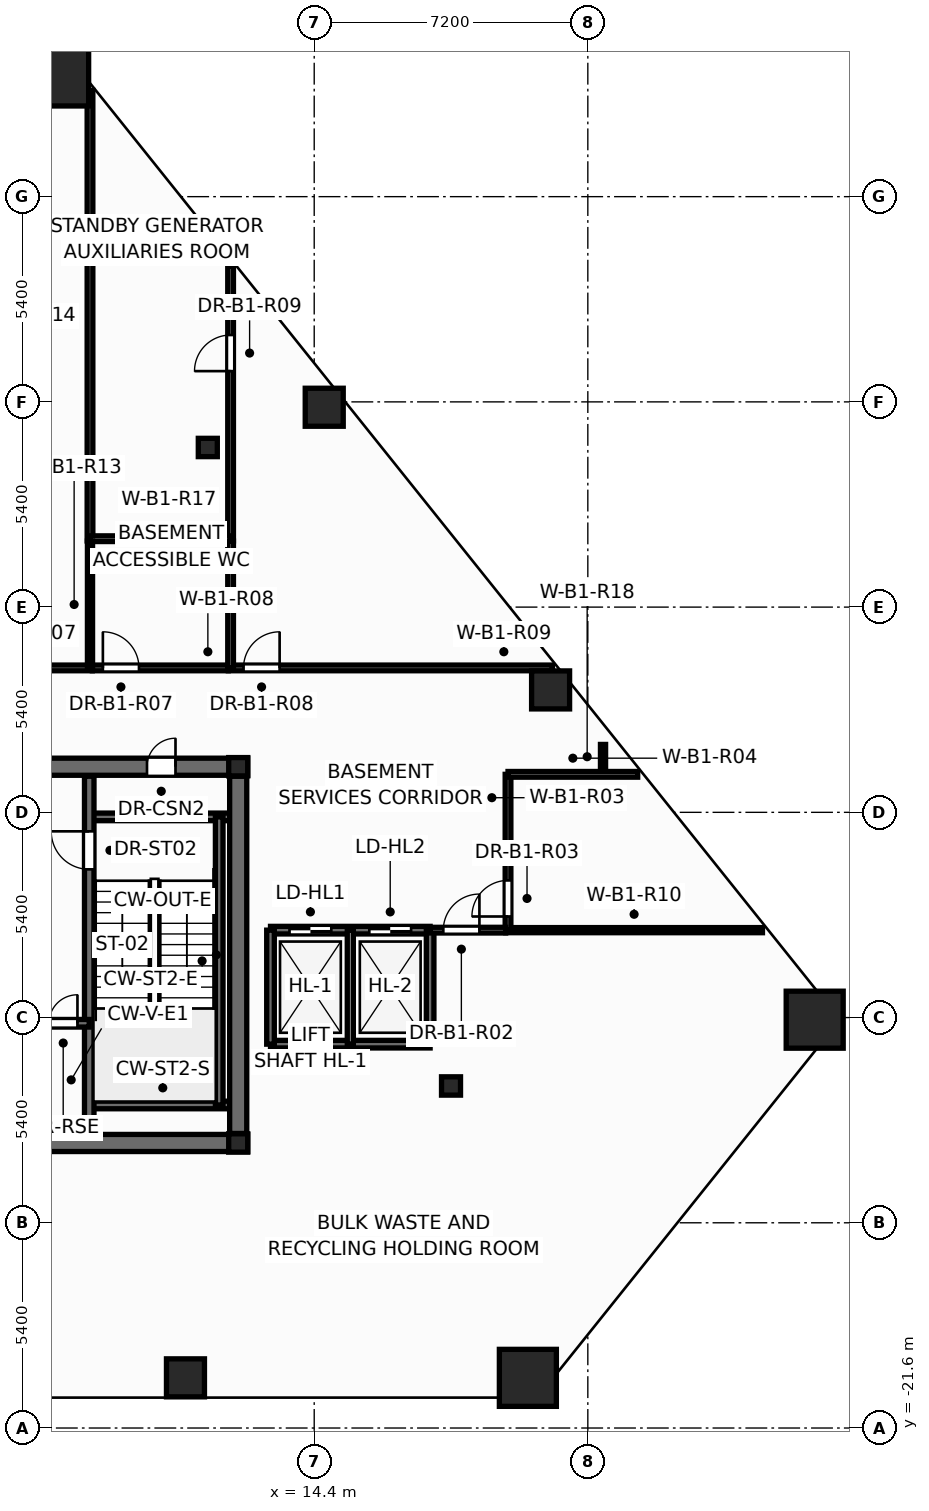
"""IFC4 building model, lengths in metres.
Left out: names, types, materials, properties, quantities, classifications, styles, units other than length and angle.
Written with IfcOpenShell. Run it as: python <this file> out.ifc"""

import sys

from ifc_helpers import new_model, si_unit, direction, frame, frame_2d, origin, origin_2d, place, context, subcontext, project, spatial, rectangle, hollow_rectangle, hollow_circle, i_section, extrude, element, fill, save


model = new_model("IFC4")
c1 = context("Model", 3, precision=1e-05, world=origin(), true_north=direction((0.0, 1.0)))
c2 = subcontext(c1, "Body", "Model", "MODEL_VIEW")
j1 = project(units=[si_unit("LENGTHUNIT", "METRE"), si_unit("PLANEANGLEUNIT", "RADIAN")], contexts=[c1])
p1 = place(None, origin())
s1 = spatial("IfcSite", under=j1, at=p1, CompositionType="ELEMENT")
p2 = place(p1, origin())
s2 = spatial("IfcBuilding", under=s1, at=p2, CompositionType="ELEMENT")
p3 = place(p2, frame((0.0, 0.0, -4.8)))
s3 = spatial("IfcBuildingStorey", under=s2, at=p3, CompositionType="ELEMENT", Elevation=-4.8)
for number, where, z_axis, x_axis in (
    (1, (20.022, -20.28, 0.0), (0.0, 0.0, 1.0), (1.0, 0.0, 0.0)),
    (2, (27.57, -10.856, 0.0), (0.0, 0.0, 1.0), (1.0, 0.0, 0.0)),
    (3, (7.714, 13.936, 0.0), (0.0, 0.0, 1.0), (1.0, 0.0, 0.0)),
):
    element("IfcColumn", number, at=place(p3, frame(where, z_axis=z_axis, x_axis=x_axis)), inside=s3, PredefinedType="COLUMN", context=c2, shape_type="SweptSolid", body=[
        extrude(hollow_rectangle(XDim=1.5, YDim=1.5, WallThickness=0.075, at=origin_2d()), origin(), (0.0, 0.0, 1.0), 4.8),
    ])
for number, where, z_axis, x_axis in (
    (4, (11.012, -20.28, 0.0), (0.0, 0.0, 1.0), (1.0, 0.0, 0.0)),
    (5, (20.62, -2.179, 0.0), (0.0, 0.0, 1.0), (1.0, 0.0, 0.0)),
    (6, (14.664, 5.259, 0.0), (0.0, 0.0, 1.0), (1.0, 0.0, 0.0)),
):
    element("IfcColumn", number, at=place(p3, frame(where, z_axis=z_axis, x_axis=x_axis)), inside=s3, PredefinedType="COLUMN", context=c2, shape_type="SweptSolid", body=[
        extrude(hollow_circle(Radius=0.5, WallThickness=0.045, at=origin_2d()), origin(), (0.0, 0.0, 1.0), 4.8),
    ])
for number, where, z_axis, x_axis in (
    (7, (12.4, -14.1, 0.0), (0.0, 0.0, 1.0), (1.0, 0.0, 0.0)),
    (8, (12.4, -4.2, 0.0), (0.0, 0.0, 1.0), (1.0, 0.0, 0.0)),
    (9, (18.0, -12.6, 0.0), (0.0, 0.0, 1.0), (1.0, 0.0, 0.0)),
    (10, (11.6, 4.2, 0.0), (0.0, 0.0, 1.0), (1.0, 0.0, 0.0)),
):
    element("IfcColumn", number, at=place(p3, frame(where, z_axis=z_axis, x_axis=x_axis)), inside=s3, PredefinedType="COLUMN", context=c2, shape_type="SweptSolid", body=[
        extrude(i_section(OverallWidth=0.5, OverallDepth=0.482, WebThickness=0.04, FlangeThickness=0.045, at=origin_2d()), origin(), (0.0, 0.0, 1.0), 4.8),
    ])
p4 = place(p3, frame((-12.65, -14.1, 0.0), z_axis=(0.0, 0.0, 1.0), x_axis=(1.0, 0.0, 0.0)))
e11 = element("IfcWall", 11, at=p4, inside=s3, PredefinedType="SHEAR", context=c2, shape_type="SweptSolid", body=[
    extrude(rectangle(XDim=25.3, YDim=0.45, at=frame_2d((12.65, 0.0))), origin(), (0.0, 0.0, 1.0), 4.8),
])
p5 = place(p3, frame((-12.65, -4.2, 0.0), z_axis=(0.0, 0.0, 1.0), x_axis=(1.0, 0.0, 0.0)))
e12 = element("IfcWall", 12, at=p5, inside=s3, PredefinedType="SHEAR", context=c2, shape_type="SweptSolid", body=[
    extrude(rectangle(XDim=25.3, YDim=0.45, at=frame_2d((12.65, 0.0))), origin(), (0.0, 0.0, 1.0), 4.8),
])
p6 = place(p5, frame((1.85, 0.0, 0.0)))
e13 = element("IfcOpeningElement", 13, at=p6, cuts=e12, PredefinedType="OPENING", context=c2, shape_type="SweptSolid", body=[
    extrude(rectangle(XDim=0.756, YDim=2.054, at=frame_2d((0.375, 1.027))), frame((0.0, 0.235, 0.0), z_axis=(0.0, -1.0, 0.0), x_axis=(1.0, 0.0, 0.0)), (0.0, 0.0, 1.0), 0.47),
])
p7 = place(p5, frame((22.65, 0.0, 0.0)))
e14 = element("IfcOpeningElement", 14, at=p7, cuts=e12, PredefinedType="OPENING", context=c2, shape_type="SweptSolid", body=[
    extrude(rectangle(XDim=0.756, YDim=2.054, at=frame_2d((0.375, 1.027))), frame((0.0, 0.235, 0.0), z_axis=(0.0, -1.0, 0.0), x_axis=(1.0, 0.0, 0.0)), (0.0, 0.0, 1.0), 0.47),
])
p8 = place(p5, frame((5.85, 0.0, 0.0)))
e15 = element("IfcOpeningElement", 15, at=p8, cuts=e12, PredefinedType="OPENING", context=c2, shape_type="SweptSolid", body=[
    extrude(rectangle(XDim=1.006, YDim=2.104, at=frame_2d((0.5, 1.052))), frame((0.0, 0.235, 0.0), z_axis=(0.0, -1.0, 0.0), x_axis=(1.0, 0.0, 0.0)), (0.0, 0.0, 1.0), 0.47),
])
p9 = place(p5, frame((10.35, 0.0, 0.0)))
e16 = element("IfcOpeningElement", 16, at=p9, cuts=e12, PredefinedType="OPENING", context=c2, shape_type="SweptSolid", body=[
    extrude(rectangle(XDim=1.406, YDim=2.154, at=frame_2d((0.7, 1.077))), frame((0.0, 0.235, 0.0), z_axis=(0.0, -1.0, 0.0), x_axis=(1.0, 0.0, 0.0)), (0.0, 0.0, 1.0), 0.47),
])
p10 = place(p5, frame((18.45, 0.0, 0.0)))
e17 = element("IfcOpeningElement", 17, at=p10, cuts=e12, PredefinedType="OPENING", context=c2, shape_type="SweptSolid", body=[
    extrude(rectangle(XDim=1.006, YDim=2.104, at=frame_2d((0.5, 1.052))), frame((0.0, 0.235, 0.0), z_axis=(0.0, -1.0, 0.0), x_axis=(1.0, 0.0, 0.0)), (0.0, 0.0, 1.0), 0.47),
])
for number, where, z_axis, x_axis in (
    (18, (8.48, -5.52, 0.0), (0.0, 0.0, 1.0), (1.0, 0.0, 0.0)),
    (19, (8.48, -13.1, 0.0), (0.0, 0.0, 1.0), (1.0, 0.0, 0.0)),
):
    element("IfcWall", number, at=place(p3, frame(where, z_axis=z_axis, x_axis=x_axis)), inside=s3, PredefinedType="SOLIDWALL", context=c2, shape_type="SweptSolid", body=[
        extrude(rectangle(XDim=3.87, YDim=0.2, at=frame_2d((1.935, 0.0))), origin(), (0.0, 0.0, 1.0), 4.8),
    ])
p11 = place(p3, frame((11.9, -13.1, 0.0), z_axis=(0.0, 0.0, 1.0), x_axis=(0.0, 1.0, 0.0)))
e20 = element("IfcWall", 20, at=p11, inside=s3, PredefinedType="SOLIDWALL", context=c2, shape_type="SweptSolid", body=[
    extrude(rectangle(XDim=7.58, YDim=0.2, at=frame_2d((3.79, 0.0))), origin(), (0.0, 0.0, 1.0), 4.8),
])
p12 = place(p3, frame((8.48, -13.85, 0.0), z_axis=(0.0, 0.0, 1.0), x_axis=(0.0, 1.0, 0.0)))
e21 = element("IfcWall", 21, at=p12, inside=s3, PredefinedType="SHEAR", context=c2, shape_type="SweptSolid", body=[
    extrude(rectangle(XDim=9.4, YDim=0.25, at=frame_2d((4.7, 0.0))), origin(), (0.0, 0.0, 1.0), 4.8),
])
p13 = place(p12, frame((6.95, 0.0, 0.0)))
e22 = element("IfcOpeningElement", 22, at=p13, cuts=e21, PredefinedType="OPENING", context=c2, shape_type="SweptSolid", body=[
    extrude(rectangle(XDim=1.006, YDim=2.104, at=frame_2d((0.5, 1.052))), frame((0.0, 0.135, 0.0), z_axis=(0.0, -1.0, 0.0), x_axis=(1.0, 0.0, 0.0)), (0.0, 0.0, 1.0), 0.27),
])
p14 = place(p3, frame((5.12, -10.95, 0.0), z_axis=(0.0, 0.0, 1.0), x_axis=(1.0, 0.0, 0.0)))
e23 = element("IfcWall", 23, at=p14, inside=s3, PredefinedType="SOLIDWALL", context=c2, shape_type="SweptSolid", body=[
    extrude(rectangle(XDim=3.36, YDim=0.2, at=frame_2d((1.68, 0.0))), origin(), (0.0, 0.0, 1.0), 4.8),
])
p15 = place(p14, frame((0.42, 0.0, 0.0)))
e24 = element("IfcOpeningElement", 24, at=p15, cuts=e23, PredefinedType="OPENING", context=c2, shape_type="SweptSolid", body=[
    extrude(rectangle(XDim=1.106, YDim=2.104, at=frame_2d((0.55, 1.052))), frame((0.0, 0.11, 0.0), z_axis=(0.0, -1.0, 0.0), x_axis=(1.0, 0.0, 0.0)), (0.0, 0.0, 1.0), 0.22),
])
p16 = place(p14, frame((2.3, 0.0, 0.0)))
e25 = element("IfcOpeningElement", 25, at=p16, cuts=e23, PredefinedType="OPENING", context=c2, shape_type="SweptSolid", body=[
    extrude(rectangle(XDim=0.756, YDim=2.054, at=frame_2d((0.375, 1.027))), frame((0.0, 0.11, 0.0), z_axis=(0.0, -1.0, 0.0), x_axis=(1.0, 0.0, 0.0)), (0.0, 0.0, 1.0), 0.22),
])
p17 = place(p3, frame((12.4, -13.85, 0.0), z_axis=(0.0, 0.0, 1.0), x_axis=(0.0, 1.0, 0.0)))
e26 = element("IfcWall", 26, at=p17, inside=s3, PredefinedType="SHEAR", context=c2, shape_type="SweptSolid", body=[
    extrude(rectangle(XDim=9.4, YDim=0.45, at=frame_2d((4.7, 0.0))), origin(), (0.0, 0.0, 1.0), 4.8),
])
p18 = place(p3, frame((8.5, 1.74, 0.0), z_axis=(0.0, 0.0, 1.0), x_axis=(0.0, 1.0, 0.0)))
e27 = element("IfcWall", 27, at=p18, inside=s3, PredefinedType="PARTITIONING", context=c2, shape_type="SweptSolid", body=[
    extrude(rectangle(XDim=11.855, YDim=0.15, at=frame_2d((5.927, 0.0))), origin(), (0.0, 0.0, 1.0), 3.255),
])
p19 = place(p3, frame((-2.56, -1.6, 0.0), z_axis=(0.0, 0.0, 1.0), x_axis=(1.0, 0.0, 0.0)))
e28 = element("IfcWall", 28, at=p19, inside=s3, PredefinedType="PARTITIONING", context=c2, shape_type="SweptSolid", body=[
    extrude(rectangle(XDim=11.12, YDim=0.15, at=frame_2d((5.56, 0.0))), origin(), (0.0, 0.0, 1.0), 4.48),
])
p20 = place(p19, frame((0.399, 0.0, 0.0)))
e29 = element("IfcOpeningElement", 29, at=p20, cuts=e28, PredefinedType="OPENING", context=c2, shape_type="SweptSolid", body=[
    extrude(rectangle(XDim=0.956, YDim=2.104, at=frame_2d((0.475, 1.052))), frame((0.0, 0.085, 0.0), z_axis=(0.0, -1.0, 0.0), x_axis=(1.0, 0.0, 0.0)), (0.0, 0.0, 1.0), 0.17),
])
p21 = place(p3, frame((12.14, -1.6, 0.0), z_axis=(0.0, 0.0, 1.0), x_axis=(1.0, 0.0, 0.0)))
e30 = element("IfcWall", 30, at=p21, inside=s3, PredefinedType="PARTITIONING", context=c2, shape_type="SweptSolid", body=[
    extrude(rectangle(XDim=8.529, YDim=0.15, at=frame_2d((4.265, 0.0))), origin(), (0.0, 0.0, 1.0), 3.547),
])
p22 = place(p21, frame((0.4, 0.0, 0.0)))
e31 = element("IfcOpeningElement", 31, at=p22, cuts=e30, PredefinedType="OPENING", context=c2, shape_type="SweptSolid", body=[
    extrude(rectangle(XDim=0.956, YDim=2.104, at=frame_2d((0.475, 1.052))), frame((0.0, 0.085, 0.0), z_axis=(0.0, -1.0, 0.0), x_axis=(1.0, 0.0, 0.0)), (0.0, 0.0, 1.0), 0.17),
])
p23 = place(p3, frame((12.2, 1.74, 0.0), z_axis=(0.0, 0.0, 1.0), x_axis=(0.0, 1.0, 0.0)))
e32 = element("IfcWall", 32, at=p23, inside=s3, PredefinedType="PARTITIONING", context=c2, shape_type="SweptSolid", body=[
    extrude(rectangle(XDim=7.235, YDim=0.15, at=frame_2d((3.617, 0.0))), origin(), (0.0, 0.0, 1.0), 3.547),
])
p24 = place(p23, frame((4.469, 0.0, 0.0)))
e33 = element("IfcOpeningElement", 33, at=p24, cuts=e32, PredefinedType="OPENING", context=c2, shape_type="SweptSolid", body=[
    extrude(rectangle(XDim=0.956, YDim=2.104, at=frame_2d((0.475, 1.052))), frame((0.0, 0.085, 0.0), z_axis=(0.0, -1.0, 0.0), x_axis=(1.0, 0.0, 0.0)), (0.0, 0.0, 1.0), 0.17),
])
p25 = place(p3, frame((19.44, -8.5, 0.0), z_axis=(0.0, 0.0, 1.0), x_axis=(1.0, 0.0, 0.0)))
e34 = element("IfcWall", 34, at=p25, inside=s3, PredefinedType="PARTITIONING", context=c2, shape_type="SweptSolid", body=[
    extrude(rectangle(XDim=6.755, YDim=0.135, at=frame_2d((3.378, 0.0))), origin(), (0.0, 0.0, 1.0), 3.844),
])
p26 = place(p3, frame((13.25, -11.5, 0.0), z_axis=(0.0, 0.0, 1.0), x_axis=(1.0, 0.0, 0.0)))
e35 = element("IfcWall", 35, at=p26, inside=s3, PredefinedType="SOLIDWALL", context=c2, shape_type="SweptSolid", body=[
    extrude(rectangle(XDim=4.2, YDim=0.2, at=frame_2d((2.1, 0.0))), origin(), (0.0, 0.0, 1.0), 4.8),
])
p27 = place(p3, frame((13.25, -8.5, 0.0), z_axis=(0.0, 0.0, 1.0), x_axis=(1.0, 0.0, 0.0)))
e36 = element("IfcWall", 36, at=p27, inside=s3, PredefinedType="SOLIDWALL", context=c2, shape_type="SweptSolid", body=[
    extrude(rectangle(XDim=4.2, YDim=0.2, at=frame_2d((2.1, 0.0))), origin(), (0.0, 0.0, 1.0), 4.8),
])
p28 = place(p27, frame((0.5, 0.0, 0.0)))
e37 = element("IfcOpeningElement", 37, at=p28, cuts=e36, PredefinedType="OPENING", context=c2, shape_type="SweptSolid", body=[
    extrude(rectangle(XDim=1.106, YDim=2.104, at=frame_2d((0.55, 1.052))), frame((0.0, 0.11, 0.0), z_axis=(0.0, -1.0, 0.0), x_axis=(1.0, 0.0, 0.0)), (0.0, 0.0, 1.0), 0.22),
])
p29 = place(p27, frame((2.6, 0.0, 0.0)))
e38 = element("IfcOpeningElement", 38, at=p29, cuts=e36, PredefinedType="OPENING", context=c2, shape_type="SweptSolid", body=[
    extrude(rectangle(XDim=1.106, YDim=2.104, at=frame_2d((0.55, 1.052))), frame((0.0, 0.11, 0.0), z_axis=(0.0, -1.0, 0.0), x_axis=(1.0, 0.0, 0.0)), (0.0, 0.0, 1.0), 0.22),
])
p30 = place(p3, frame((19.5, -8.5, 0.0), z_axis=(0.0, 0.0, 1.0), x_axis=(0.0, 1.0, 0.0)))
e39 = element("IfcWall", 39, at=p30, inside=s3, PredefinedType="PARTITIONING", context=c2, shape_type="SweptSolid", body=[
    extrude(rectangle(XDim=4.1, YDim=0.15, at=frame_2d((2.05, 0.0))), origin(), (0.0, 0.0, 1.0), 4.48),
])
p31 = place(p30, frame((0.359, 0.0, 0.0)))
e40 = element("IfcOpeningElement", 40, at=p31, cuts=e39, PredefinedType="OPENING", context=c2, shape_type="SweptSolid", body=[
    extrude(rectangle(XDim=0.956, YDim=2.104, at=frame_2d((0.475, 1.052))), frame((0.0, 0.085, 0.0), z_axis=(0.0, -1.0, 0.0), x_axis=(1.0, 0.0, 0.0)), (0.0, 0.0, 1.0), 0.17),
])
p32 = place(p3, frame((8.562, -1.6, 0.0), z_axis=(0.0, 0.0, 1.0), x_axis=(1.0, 0.0, 0.0)))
e41 = element("IfcWall", 41, at=p32, inside=s3, PredefinedType="PARTITIONING", context=c2, shape_type="SweptSolid", body=[
    extrude(rectangle(XDim=3.576, YDim=0.15, at=frame_2d((1.788, 0.0))), origin(), (0.0, 0.0, 1.0), 4.48),
])
p33 = place(p32, frame((0.277, 0.0, 0.0)))
e42 = element("IfcOpeningElement", 42, at=p33, cuts=e41, PredefinedType="OPENING", context=c2, shape_type="SweptSolid", body=[
    extrude(rectangle(XDim=0.956, YDim=2.104, at=frame_2d((0.475, 1.052))), frame((0.0, 0.085, 0.0), z_axis=(0.0, -1.0, 0.0), x_axis=(1.0, 0.0, 0.0)), (0.0, 0.0, 1.0), 0.17),
])
p34 = place(p3, frame((8.5, 1.8, 0.0), z_axis=(0.0, 0.0, 1.0), x_axis=(1.0, 0.0, 0.0)))
e43 = element("IfcWall", 43, at=p34, inside=s3, PredefinedType="PARTITIONING", context=c2, shape_type="SweptSolid", body=[
    extrude(rectangle(XDim=3.7, YDim=0.15, at=frame_2d((1.85, 0.0))), origin(), (0.0, 0.0, 1.0), 4.48),
])
p35 = place(p3, frame((8.5, -1.6, 0.0), z_axis=(0.0, 0.0, 1.0), x_axis=(0.0, 1.0, 0.0)))
e44 = element("IfcWall", 44, at=p35, inside=s3, PredefinedType="PARTITIONING", context=c2, shape_type="SweptSolid", body=[
    extrude(rectangle(XDim=3.338, YDim=0.135, at=frame_2d((1.669, 0.0))), origin(), (0.0, 0.0, 1.0), 4.48),
])
p36 = place(p3, frame((19.5, -4.4, 0.0), z_axis=(0.0, 0.0, 1.0), x_axis=(1.0, 0.0, 0.0)))
e45 = element("IfcWall", 45, at=p36, inside=s3, PredefinedType="PARTITIONING", context=c2, shape_type="SweptSolid", body=[
    extrude(rectangle(XDim=3.412, YDim=0.15, at=frame_2d((1.706, 0.0))), origin(), (0.0, 0.0, 1.0), 3.844),
])
p37 = place(p3, frame((12.2, -1.6, 0.0), z_axis=(0.0, 0.0, 1.0), x_axis=(0.0, 1.0, 0.0)))
e46 = element("IfcWall", 46, at=p37, inside=s3, PredefinedType="PARTITIONING", context=c2, shape_type="SweptSolid", body=[
    extrude(rectangle(XDim=3.338, YDim=0.15, at=frame_2d((1.669, 0.0))), origin(), (0.0, 0.0, 1.0), 4.48),
])
for number, where, z_axis, x_axis in (
    (47, (13.25, -11.5, 0.0), (0.0, 0.0, 1.0), (0.0, 1.0, 0.0)),
    (48, (17.45, -11.5, 0.0), (0.0, 0.0, 1.0), (0.0, 1.0, 0.0)),
):
    element("IfcWall", number, at=place(p3, frame(where, z_axis=z_axis, x_axis=x_axis)), inside=s3, PredefinedType="SOLIDWALL", context=c2, shape_type="SweptSolid", body=[
        extrude(rectangle(XDim=3.0, YDim=0.2, at=frame_2d((1.5, 0.0))), origin(), (0.0, 0.0, 1.0), 4.8),
    ])
p38 = place(p3, frame((15.35, -11.5, 0.0), z_axis=(0.0, 0.0, 1.0), x_axis=(0.0, 1.0, 0.0)))
e49 = element("IfcWall", 49, at=p38, inside=s3, PredefinedType="PARTITIONING", context=c2, shape_type="SweptSolid", body=[
    extrude(rectangle(XDim=3.0, YDim=0.16, at=frame_2d((1.5, 0.0))), origin(), (0.0, 0.0, 1.0), 4.48),
])
p39 = place(p3, frame((17.452, -8.5, 0.0), z_axis=(0.0, 0.0, 1.0), x_axis=(1.0, 0.0, 0.0)))
e50 = element("IfcWall", 50, at=p39, inside=s3, PredefinedType="PARTITIONING", context=c2, shape_type="SweptSolid", body=[
    extrude(rectangle(XDim=1.986, YDim=0.15, at=frame_2d((0.993, 0.0))), origin(), (0.0, 0.0, 1.0), 4.48),
])
p40 = place(p39, frame((0.345, 0.0, 0.0)))
e51 = element("IfcOpeningElement", 51, at=p40, cuts=e50, PredefinedType="OPENING", context=c2, shape_type="SweptSolid", body=[
    extrude(rectangle(XDim=0.956, YDim=2.104, at=frame_2d((0.475, 1.052))), frame((0.0, 0.085, 0.0), z_axis=(0.0, -1.0, 0.0), x_axis=(1.0, 0.0, 0.0)), (0.0, 0.0, 1.0), 0.17),
])
p41 = place(p3, frame((22.0, -4.26, 0.0), z_axis=(0.0, 0.0, 1.0), x_axis=(0.0, 1.0, 0.0)))
e52 = element("IfcWall", 52, at=p41, inside=s3, PredefinedType="PARTITIONING", context=c2, shape_type="SweptSolid", body=[
    extrude(rectangle(XDim=0.646, YDim=0.135, at=frame_2d((0.323, 0.0))), origin(), (0.0, 0.0, 1.0), 3.844),
])
p42 = place(p13, origin())
e53 = element("IfcDoor", 53, at=p42, inside=s3, OperationType="SINGLE_SWING_RIGHT", PredefinedType="DOOR", context=c2, shape_type="SweptSolid", body=[
    extrude(rectangle(XDim=1.0, YDim=2.1, at=frame_2d((0.5, 1.05))), frame((0.0, 0.025, 0.0), z_axis=(0.0, -1.0, 0.0), x_axis=(1.0, 0.0, 0.0)), (0.0, 0.0, 1.0), 0.05),
])
fill(e22, e53)
p43 = place(p16, origin())
e54 = element("IfcDoor", 54, at=p43, inside=s3, OperationType="SINGLE_SWING_RIGHT", PredefinedType="DOOR", context=c2, shape_type="SweptSolid", body=[
    extrude(rectangle(XDim=0.75, YDim=2.05, at=frame_2d((0.375, 1.025))), frame((0.0, 0.025, 0.0), z_axis=(0.0, -1.0, 0.0), x_axis=(1.0, 0.0, 0.0)), (0.0, 0.0, 1.0), 0.05),
])
fill(e25, e54)
p44 = place(p7, origin())
e55 = element("IfcDoor", 55, at=p44, inside=s3, OperationType="SINGLE_SWING_RIGHT", PredefinedType="DOOR", context=c2, shape_type="SweptSolid", body=[
    extrude(rectangle(XDim=0.75, YDim=2.05, at=frame_2d((0.375, 1.025))), frame((0.0, 0.025, 0.0), z_axis=(0.0, -1.0, 0.0), x_axis=(1.0, 0.0, 0.0)), (0.0, 0.0, 1.0), 0.05),
])
fill(e14, e55)
p45 = place(p28, origin())
e56 = element("IfcDoor", 56, at=p45, inside=s3, OperationType="DOUBLE_DOOR_SLIDING", PredefinedType="DOOR", context=c2, shape_type="SweptSolid", body=[
    extrude(rectangle(XDim=1.1, YDim=2.1, at=frame_2d((0.55, 1.05))), frame((0.0, 0.025, 0.0), z_axis=(0.0, -1.0, 0.0), x_axis=(1.0, 0.0, 0.0)), (0.0, 0.0, 1.0), 0.05),
])
fill(e37, e56)
p46 = place(p29, origin())
e57 = element("IfcDoor", 57, at=p46, inside=s3, OperationType="DOUBLE_DOOR_SLIDING", PredefinedType="DOOR", context=c2, shape_type="SweptSolid", body=[
    extrude(rectangle(XDim=1.1, YDim=2.1, at=frame_2d((0.55, 1.05))), frame((0.0, 0.025, 0.0), z_axis=(0.0, -1.0, 0.0), x_axis=(1.0, 0.0, 0.0)), (0.0, 0.0, 1.0), 0.05),
])
fill(e38, e57)
p47 = place(p40, origin())
e58 = element("IfcDoor", 58, at=p47, inside=s3, OperationType="SINGLE_SWING_RIGHT", PredefinedType="DOOR", context=c2, shape_type="SweptSolid", body=[
    extrude(rectangle(XDim=0.95, YDim=2.1, at=frame_2d((0.475, 1.05))), frame((0.0, 0.025, 0.0), z_axis=(0.0, -1.0, 0.0), x_axis=(1.0, 0.0, 0.0)), (0.0, 0.0, 1.0), 0.05),
])
fill(e51, e58)
p48 = place(p31, origin())
e59 = element("IfcDoor", 59, at=p48, inside=s3, OperationType="SINGLE_SWING_LEFT", PredefinedType="DOOR", context=c2, shape_type="SweptSolid", body=[
    extrude(rectangle(XDim=0.95, YDim=2.1, at=frame_2d((0.475, 1.05))), frame((0.0, 0.025, 0.0), z_axis=(0.0, -1.0, 0.0), x_axis=(1.0, 0.0, 0.0)), (0.0, 0.0, 1.0), 0.05),
])
fill(e40, e59)
p49 = place(p33, origin())
e60 = element("IfcDoor", 60, at=p49, inside=s3, OperationType="SINGLE_SWING_LEFT", PredefinedType="DOOR", context=c2, shape_type="SweptSolid", body=[
    extrude(rectangle(XDim=0.95, YDim=2.1, at=frame_2d((0.475, 1.05))), frame((0.0, 0.025, 0.0), z_axis=(0.0, -1.0, 0.0), x_axis=(1.0, 0.0, 0.0)), (0.0, 0.0, 1.0), 0.05),
])
fill(e42, e60)
p50 = place(p22, origin())
e61 = element("IfcDoor", 61, at=p50, inside=s3, OperationType="SINGLE_SWING_RIGHT", PredefinedType="DOOR", context=c2, shape_type="SweptSolid", body=[
    extrude(rectangle(XDim=0.95, YDim=2.1, at=frame_2d((0.475, 1.05))), frame((0.0, 0.025, 0.0), z_axis=(0.0, -1.0, 0.0), x_axis=(1.0, 0.0, 0.0)), (0.0, 0.0, 1.0), 0.05),
])
fill(e31, e61)
p51 = place(p24, origin())
e62 = element("IfcDoor", 62, at=p51, inside=s3, OperationType="SINGLE_SWING_LEFT", PredefinedType="DOOR", context=c2, shape_type="SweptSolid", body=[
    extrude(rectangle(XDim=0.95, YDim=2.1, at=frame_2d((0.475, 1.05))), frame((0.0, 0.025, 0.0), z_axis=(0.0, -1.0, 0.0), x_axis=(1.0, 0.0, 0.0)), (0.0, 0.0, 1.0), 0.05),
])
fill(e33, e62)
save(model, sys.argv[1])
